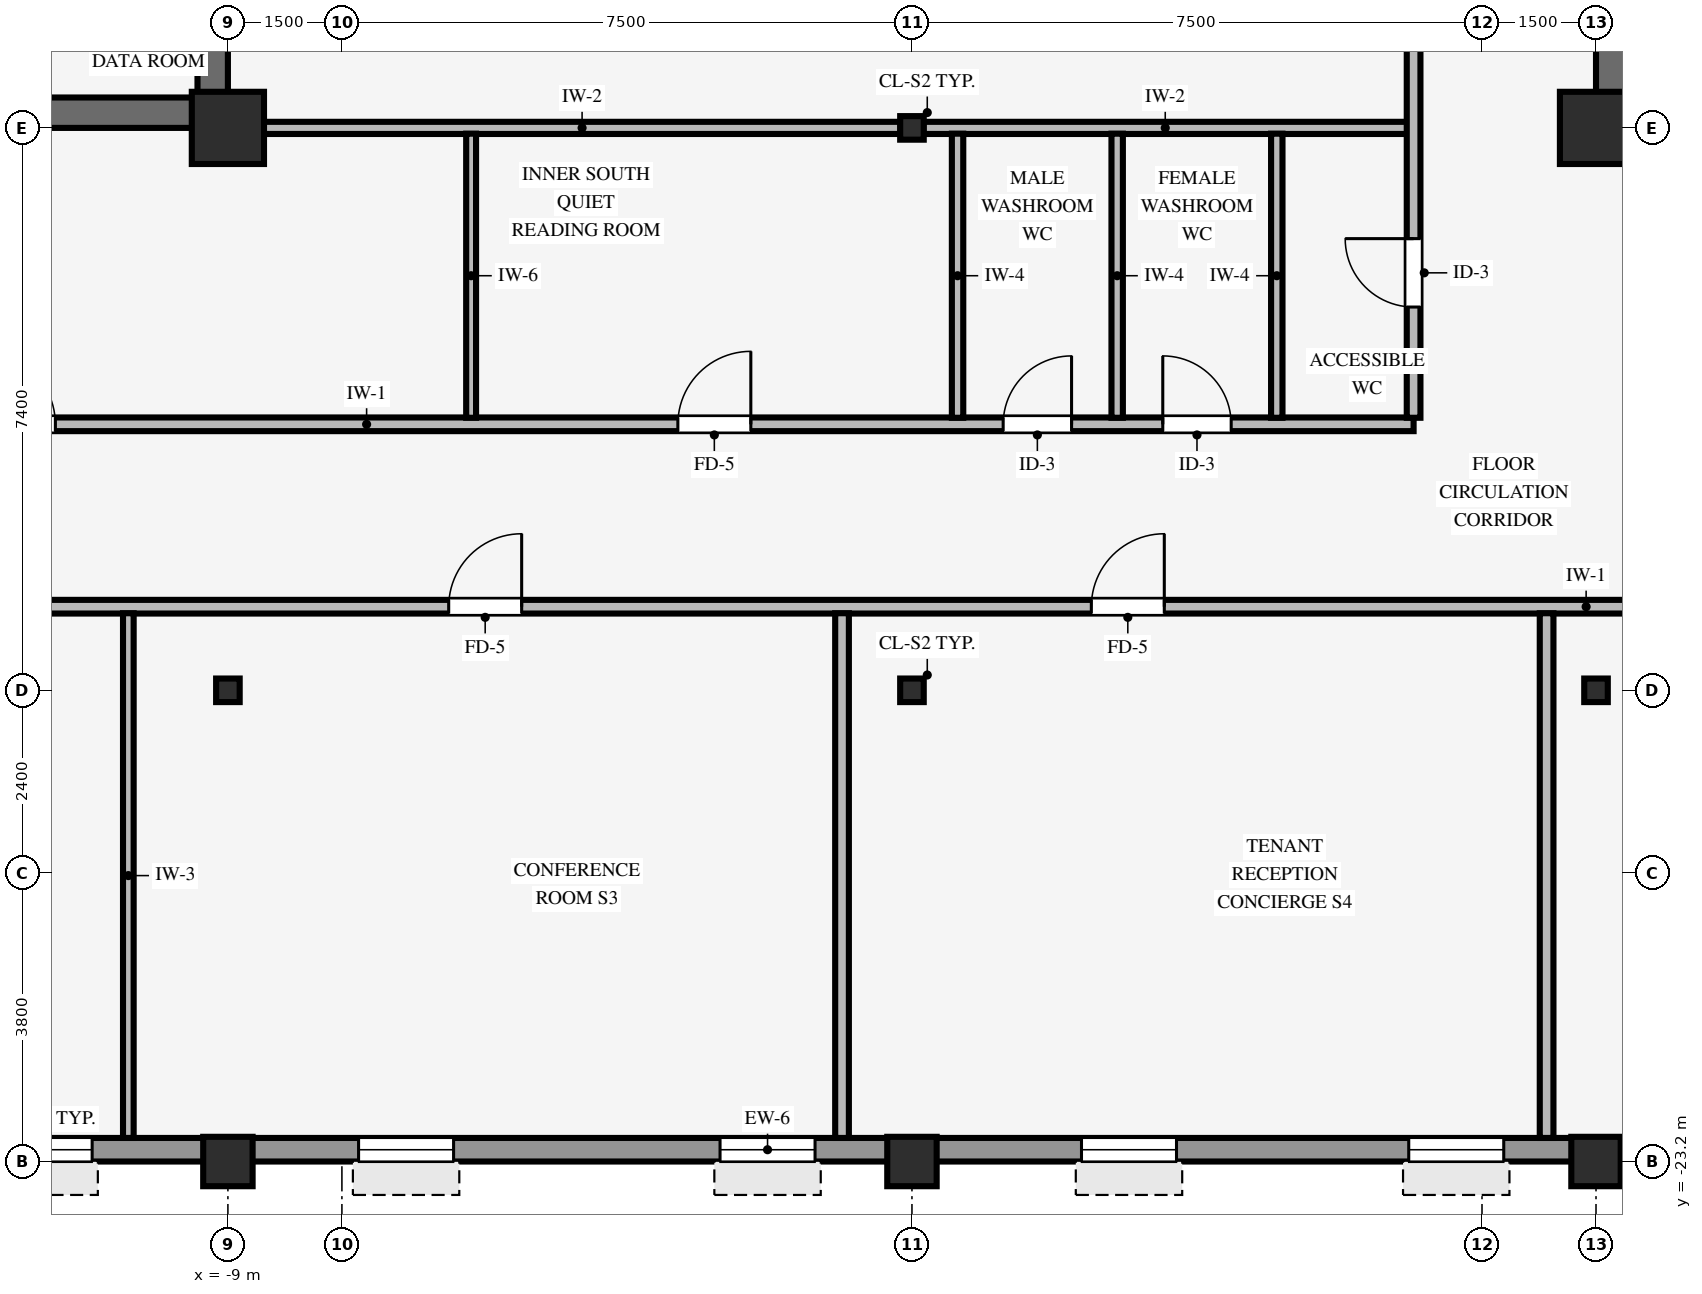
"""IFC4 building model, lengths in metres.
Left out: names, types, materials, properties, quantities, classifications, styles, units other than length and angle.
Written with IfcOpenShell. Run it as: python <this file> out.ifc"""

import sys

from ifc_helpers import new_model, si_unit, direction, frame, frame_2d, origin, origin_2d, place, context, subcontext, project, spatial, rectangle, hollow_rectangle, i_section, extrude, source, transform, mapped, element, fill, save


model = new_model("IFC4")
c1 = context("Model", 3, precision=1e-05, world=origin(), true_north=direction((0.0, 1.0)))
c2 = subcontext(c1, "Body", "Model", "MODEL_VIEW")
j1 = project(units=[si_unit("LENGTHUNIT", "METRE"), si_unit("PLANEANGLEUNIT", "RADIAN")], contexts=[c1])
p1 = place(None, origin())
s1 = spatial("IfcSite", under=j1, at=p1, CompositionType="ELEMENT")
p2 = place(p1, origin())
s2 = spatial("IfcBuilding", under=s1, at=p2, CompositionType="ELEMENT")
p3 = place(p2, frame((0.0, 0.0, 182.25)))
s3 = spatial("IfcBuildingStorey", under=s2, at=p3, CompositionType="ELEMENT", Elevation=182.25)
p4 = place(p3, frame((-17.5, -9.4, 0.0), z_axis=(0.0, 0.0, 1.0), x_axis=(1.0, 0.0, 0.0)))
e1 = element("IfcWall", 1, at=p4, inside=s3, PredefinedType="SHEAR", context=c2, shape_type="SweptSolid", body=[
    extrude(rectangle(XDim=8.5, YDim=0.4, at=frame_2d((4.25, 0.0))), origin(), (0.0, 0.0, 1.0), 3.25),
])
p5 = place(p3, frame((-9.2, -9.205, 0.0), z_axis=(0.0, 0.0, 1.0), x_axis=(0.0, 1.0, 0.0)))
e2 = element("IfcWall", 2, at=p5, inside=s3, PredefinedType="SHEAR", context=c2, shape_type="SweptSolid", body=[
    extrude(rectangle(XDim=18.41, YDim=0.4, at=frame_2d((9.205, 0.0))), origin(), (0.0, 0.0, 1.0), 3.25),
])
p6 = place(p5, frame((8.605, 0.0, 0.0)))
e3 = element("IfcOpeningElement", 3, at=p6, cuts=e2, PredefinedType="OPENING", context=c2, shape_type="SweptSolid", body=[
    extrude(rectangle(XDim=1.2, YDim=2.15, at=frame_2d((0.6, 1.075))), frame((0.0, 0.21, 0.0), z_axis=(0.0, -1.0, 0.0), x_axis=(1.0, 0.0, 0.0)), (0.0, 0.0, 1.0), 0.42),
])
p7 = place(p3, frame((9.0, -9.4, 0.0), z_axis=(0.0, 0.0, 1.0), x_axis=(1.0, 0.0, 0.0)))
e4 = element("IfcWall", 4, at=p7, inside=s3, PredefinedType="SHEAR", context=c2, shape_type="SweptSolid", body=[
    extrude(rectangle(XDim=8.5, YDim=0.4, at=frame_2d((4.25, 0.0))), origin(), (0.0, 0.0, 1.0), 3.25),
])
p8 = place(p3, frame((9.2, -9.205, 0.0), z_axis=(0.0, 0.0, 1.0), x_axis=(0.0, 1.0, 0.0)))
e5 = element("IfcWall", 5, at=p8, inside=s3, PredefinedType="SHEAR", context=c2, shape_type="SweptSolid", body=[
    extrude(rectangle(XDim=18.41, YDim=0.4, at=frame_2d((9.205, 0.0))), origin(), (0.0, 0.0, 1.0), 3.25),
])
p9 = place(p8, frame((8.605, 0.0, 0.0)))
e6 = element("IfcOpeningElement", 6, at=p9, cuts=e5, PredefinedType="OPENING", context=c2, shape_type="SweptSolid", body=[
    extrude(rectangle(XDim=1.2, YDim=2.15, at=frame_2d((0.6, 1.075))), frame((0.0, 0.21, 0.0), z_axis=(0.0, -1.0, 0.0), x_axis=(1.0, 0.0, 0.0)), (0.0, 0.0, 1.0), 0.42),
])
for number, where, z_axis, x_axis in (
    (7, (-9.0, -9.6, 0.0), (0.0, 0.0, 1.0), (1.0, 0.0, 0.0)),
    (8, (9.0, -9.6, 0.0), (0.0, 0.0, 1.0), (1.0, 0.0, 0.0)),
):
    element("IfcColumn", number, at=place(p3, frame(where, z_axis=z_axis, x_axis=x_axis)), inside=s3, PredefinedType="COLUMN", context=c2, shape_type="SweptSolid", body=[
        extrude(rectangle(XDim=0.95, YDim=0.95, at=origin_2d()), origin(), (0.0, 0.0, 1.0), 3.25),
    ])
for number, where, z_axis, x_axis in (
    (9, (-9.0, -23.2, 0.0), (0.0, 0.0, 1.0), (1.0, 0.0, 0.0)),
    (10, (0.0, -23.2, 0.0), (0.0, 0.0, 1.0), (1.0, 0.0, 0.0)),
    (11, (9.0, -23.2, 0.0), (0.0, 0.0, 1.0), (1.0, 0.0, 0.0)),
):
    element("IfcColumn", number, at=place(p3, frame(where, z_axis=z_axis, x_axis=x_axis)), inside=s3, PredefinedType="COLUMN", context=c2, shape_type="SweptSolid", body=[
        extrude(hollow_rectangle(XDim=0.65, YDim=0.65, WallThickness=0.04, InnerFilletRadius=0.04, OuterFilletRadius=0.08, at=origin_2d()), origin(), (0.0, 0.0, 1.0), 3.25),
    ])
for number, where, z_axis, x_axis in (
    (12, (0.0, -17.0, 0.0), (0.0, 0.0, 1.0), (1.0, 0.0, 0.0)),
    (13, (0.0, -9.6, 0.0), (0.0, 0.0, 1.0), (1.0, 0.0, 0.0)),
    (14, (-9.0, -17.0, 0.0), (0.0, 0.0, 1.0), (1.0, 0.0, 0.0)),
    (15, (9.0, -17.0, 0.0), (0.0, 0.0, 1.0), (1.0, 0.0, 0.0)),
):
    element("IfcColumn", number, at=place(p3, frame(where, z_axis=z_axis, x_axis=x_axis)), inside=s3, PredefinedType="COLUMN", context=c2, shape_type="SweptSolid", body=[
        extrude(i_section(OverallWidth=0.31, OverallDepth=0.31, WebThickness=0.015, FlangeThickness=0.015, FilletRadius=0.015, at=origin_2d()), origin(), (0.0, 0.0, 1.0), 3.25),
    ])
p10 = place(p3, frame((-24.3, -23.045, 0.0), z_axis=(0.0, 0.0, 1.0), x_axis=(1.0, 0.0, 0.0)))
e16 = element("IfcWall", 16, at=p10, inside=s3, PredefinedType="STANDARD", context=c2, shape_type="SweptSolid", body=[
    extrude(rectangle(XDim=44.8, YDim=0.31, at=frame_2d((22.4, 0.0))), origin(), (0.0, 0.0, 1.0), 2.585),
])
p11 = place(p10, frame((2.753, 0.0, 0.8)))
e17 = element("IfcOpeningElement", 17, at=p11, cuts=e16, PredefinedType="OPENING", context=c2, shape_type="SweptSolid", body=[
    extrude(rectangle(XDim=1.25, YDim=1.52, at=frame_2d((0.625, 0.76))), frame((0.0, 0.165, 0.0), z_axis=(0.0, -1.0, 0.0), x_axis=(1.0, 0.0, 0.0)), (0.0, 0.0, 1.0), 0.33),
])
p12 = place(p10, frame((7.508, 0.0, 0.8)))
e18 = element("IfcOpeningElement", 18, at=p12, cuts=e16, PredefinedType="OPENING", context=c2, shape_type="SweptSolid", body=[
    extrude(rectangle(XDim=1.25, YDim=1.52, at=frame_2d((0.625, 0.76))), frame((0.0, 0.165, 0.0), z_axis=(0.0, -1.0, 0.0), x_axis=(1.0, 0.0, 0.0)), (0.0, 0.0, 1.0), 0.33),
])
p13 = place(p10, frame((12.264, 0.0, 0.8)))
e19 = element("IfcOpeningElement", 19, at=p13, cuts=e16, PredefinedType="OPENING", context=c2, shape_type="SweptSolid", body=[
    extrude(rectangle(XDim=1.25, YDim=1.52, at=frame_2d((0.625, 0.76))), frame((0.0, 0.165, 0.0), z_axis=(0.0, -1.0, 0.0), x_axis=(1.0, 0.0, 0.0)), (0.0, 0.0, 1.0), 0.33),
])
p14 = place(p10, frame((17.019, 0.0, 0.8)))
e20 = element("IfcOpeningElement", 20, at=p14, cuts=e16, PredefinedType="OPENING", context=c2, shape_type="SweptSolid", body=[
    extrude(rectangle(XDim=1.25, YDim=1.52, at=frame_2d((0.625, 0.76))), frame((0.0, 0.165, 0.0), z_axis=(0.0, -1.0, 0.0), x_axis=(1.0, 0.0, 0.0)), (0.0, 0.0, 1.0), 0.33),
])
p15 = place(p10, frame((21.775, 0.0, 0.8)))
e21 = element("IfcOpeningElement", 21, at=p15, cuts=e16, PredefinedType="OPENING", context=c2, shape_type="SweptSolid", body=[
    extrude(rectangle(XDim=1.25, YDim=1.52, at=frame_2d((0.625, 0.76))), frame((0.0, 0.165, 0.0), z_axis=(0.0, -1.0, 0.0), x_axis=(1.0, 0.0, 0.0)), (0.0, 0.0, 1.0), 0.33),
])
p16 = place(p10, frame((26.531, 0.0, 0.8)))
e22 = element("IfcOpeningElement", 22, at=p16, cuts=e16, PredefinedType="OPENING", context=c2, shape_type="SweptSolid", body=[
    extrude(rectangle(XDim=1.25, YDim=1.52, at=frame_2d((0.625, 0.76))), frame((0.0, 0.165, 0.0), z_axis=(0.0, -1.0, 0.0), x_axis=(1.0, 0.0, 0.0)), (0.0, 0.0, 1.0), 0.33),
])
p17 = place(p10, frame((30.836, 0.0, 0.8)))
e23 = element("IfcOpeningElement", 23, at=p17, cuts=e16, PredefinedType="OPENING", context=c2, shape_type="SweptSolid", body=[
    extrude(rectangle(XDim=1.25, YDim=1.52, at=frame_2d((0.625, 0.76))), frame((0.0, 0.165, 0.0), z_axis=(0.0, -1.0, 0.0), x_axis=(1.0, 0.0, 0.0)), (0.0, 0.0, 1.0), 0.33),
])
p18 = place(p10, frame((36.042, 0.0, 0.8)))
e24 = element("IfcOpeningElement", 24, at=p18, cuts=e16, PredefinedType="OPENING", context=c2, shape_type="SweptSolid", body=[
    extrude(rectangle(XDim=1.25, YDim=1.52, at=frame_2d((0.625, 0.76))), frame((0.0, 0.165, 0.0), z_axis=(0.0, -1.0, 0.0), x_axis=(1.0, 0.0, 0.0)), (0.0, 0.0, 1.0), 0.33),
])
p19 = place(p10, frame((40.797, 0.0, 0.8)))
e25 = element("IfcOpeningElement", 25, at=p19, cuts=e16, PredefinedType="OPENING", context=c2, shape_type="SweptSolid", body=[
    extrude(rectangle(XDim=1.25, YDim=1.52, at=frame_2d((0.625, 0.76))), frame((0.0, 0.165, 0.0), z_axis=(0.0, -1.0, 0.0), x_axis=(1.0, 0.0, 0.0)), (0.0, 0.0, 1.0), 0.33),
])
p20 = place(p3, frame((-26.09, -15.9, 0.0), z_axis=(0.0, 0.0, 1.0), x_axis=(1.0, 0.0, 0.0)))
e26 = element("IfcWall", 26, at=p20, inside=s3, PredefinedType="PARTITIONING", context=c2, shape_type="SweptSolid", body=[
    extrude(rectangle(XDim=48.38, YDim=0.18, at=frame_2d((24.19, 0.0))), origin(), (0.0, 0.0, 1.0), 3.24),
])
p21 = place(p20, frame((40.51, 0.0, 0.0)))
e27 = element("IfcOpeningElement", 27, at=p21, cuts=e26, PredefinedType="OPENING", context=c2, shape_type="SweptSolid", body=[
    extrude(rectangle(XDim=0.96, YDim=2.1, at=frame_2d((0.48, 1.05))), frame((0.0, 0.1, 0.0), z_axis=(0.0, -1.0, 0.0), x_axis=(1.0, 0.0, 0.0)), (0.0, 0.0, 1.0), 0.2),
])
p22 = place(p20, frame((19.995, 0.0, 0.0)))
e28 = element("IfcOpeningElement", 28, at=p22, cuts=e26, PredefinedType="OPENING", context=c2, shape_type="SweptSolid", body=[
    extrude(rectangle(XDim=0.96, YDim=2.1, at=frame_2d((0.48, 1.05))), frame((0.0, 0.1, 0.0), z_axis=(0.0, -1.0, 0.0), x_axis=(1.0, 0.0, 0.0)), (0.0, 0.0, 1.0), 0.2),
])
p23 = place(p20, frame((28.45, 0.0, 0.0)))
e29 = element("IfcOpeningElement", 29, at=p23, cuts=e26, PredefinedType="OPENING", context=c2, shape_type="SweptSolid", body=[
    extrude(rectangle(XDim=0.96, YDim=2.1, at=frame_2d((0.48, 1.05))), frame((0.0, 0.1, 0.0), z_axis=(0.0, -1.0, 0.0), x_axis=(1.0, 0.0, 0.0)), (0.0, 0.0, 1.0), 0.2),
])
p24 = place(p20, frame((11.605, 0.0, 0.0)))
e30 = element("IfcOpeningElement", 30, at=p24, cuts=e26, PredefinedType="OPENING", context=c2, shape_type="SweptSolid", body=[
    extrude(rectangle(XDim=0.96, YDim=2.1, at=frame_2d((0.48, 1.05))), frame((0.0, 0.1, 0.0), z_axis=(0.0, -1.0, 0.0), x_axis=(1.0, 0.0, 0.0)), (0.0, 0.0, 1.0), 0.2),
])
p25 = place(p20, frame((2.465, 0.0, 0.0)))
e31 = element("IfcOpeningElement", 31, at=p25, cuts=e26, PredefinedType="OPENING", context=c2, shape_type="SweptSolid", body=[
    extrude(rectangle(XDim=0.96, YDim=2.1, at=frame_2d((0.48, 1.05))), frame((0.0, 0.1, 0.0), z_axis=(0.0, -1.0, 0.0), x_axis=(1.0, 0.0, 0.0)), (0.0, 0.0, 1.0), 0.2),
])
p26 = place(p3, frame((-17.7, -13.5, 0.0), z_axis=(0.0, 0.0, 1.0), x_axis=(1.0, 0.0, 0.0)))
e32 = element("IfcWall", 32, at=p26, inside=s3, PredefinedType="PARTITIONING", context=c2, shape_type="SweptSolid", body=[
    extrude(rectangle(XDim=24.3, YDim=0.18, at=frame_2d((12.15, 0.0))), origin(), (0.0, 0.0, 1.0), 2.888),
])
p27 = place(p26, frame((5.47, 0.0, 0.0)))
e33 = element("IfcOpeningElement", 33, at=p27, cuts=e32, PredefinedType="OPENING", context=c2, shape_type="SweptSolid", body=[
    extrude(rectangle(XDim=0.96, YDim=2.1, at=frame_2d((0.48, 1.05))), frame((0.0, 0.1, 0.0), z_axis=(0.0, -1.0, 0.0), x_axis=(1.0, 0.0, 0.0)), (0.0, 0.0, 1.0), 0.2),
])
p28 = place(p26, frame((14.62, 0.0, 0.0)))
e34 = element("IfcOpeningElement", 34, at=p28, cuts=e32, PredefinedType="OPENING", context=c2, shape_type="SweptSolid", body=[
    extrude(rectangle(XDim=0.96, YDim=2.1, at=frame_2d((0.48, 1.05))), frame((0.0, 0.1, 0.0), z_axis=(0.0, -1.0, 0.0), x_axis=(1.0, 0.0, 0.0)), (0.0, 0.0, 1.0), 0.2),
])
p29 = place(p26, frame((18.9, 0.0, 0.0)))
e35 = element("IfcOpeningElement", 35, at=p29, cuts=e32, PredefinedType="OPENING", context=c2, shape_type="SweptSolid", body=[
    extrude(rectangle(XDim=0.9, YDim=2.1, at=frame_2d((0.45, 1.05))), frame((0.0, 0.1, 0.0), z_axis=(0.0, -1.0, 0.0), x_axis=(1.0, 0.0, 0.0)), (0.0, 0.0, 1.0), 0.2),
])
p30 = place(p26, frame((21.0, 0.0, 0.0)))
e36 = element("IfcOpeningElement", 36, at=p30, cuts=e32, PredefinedType="OPENING", context=c2, shape_type="SweptSolid", body=[
    extrude(rectangle(XDim=0.9, YDim=2.1, at=frame_2d((0.45, 1.05))), frame((0.0, 0.1, 0.0), z_axis=(0.0, -1.0, 0.0), x_axis=(1.0, 0.0, 0.0)), (0.0, 0.0, 1.0), 0.2),
])
p31 = place(p3, frame((-8.529, -9.6, 0.0), z_axis=(0.0, 0.0, 1.0), x_axis=(1.0, 0.0, 0.0)))
e37 = element("IfcWall", 37, at=p31, inside=s3, PredefinedType="PARTITIONING", context=c2, shape_type="SweptSolid", body=[
    extrude(rectangle(XDim=8.378, YDim=0.16, at=frame_2d((4.189, 0.0))), origin(), (0.0, 0.0, 1.0), 2.285),
])
p32 = place(p3, frame((0.151, -9.6, 0.0), z_axis=(0.0, 0.0, 1.0), x_axis=(1.0, 0.0, 0.0)))
e38 = element("IfcWall", 38, at=p32, inside=s3, PredefinedType="PARTITIONING", context=c2, shape_type="SweptSolid", body=[
    extrude(rectangle(XDim=6.363, YDim=0.16, at=frame_2d((3.182, 0.0))), origin(), (0.0, 0.0, 1.0), 2.285),
])
p33 = place(p3, frame((-10.31, -22.89, 0.0), z_axis=(0.0, 0.0, 1.0), x_axis=(0.0, 1.0, 0.0)))
e39 = element("IfcWall", 39, at=p33, inside=s3, PredefinedType="PARTITIONING", context=c2, shape_type="SweptSolid", body=[
    extrude(rectangle(XDim=6.904, YDim=0.14, at=frame_2d((3.452, 0.0))), origin(), (0.0, 0.0, 1.0), 3.24),
])
p34 = place(p3, frame((-5.8, -13.414, 0.0), z_axis=(0.0, 0.0, 1.0), x_axis=(0.0, 1.0, 0.0)))
e40 = element("IfcWall", 40, at=p34, inside=s3, PredefinedType="PARTITIONING", context=c2, shape_type="SweptSolid", body=[
    extrude(rectangle(XDim=3.738, YDim=0.13, at=frame_2d((1.869, 0.0))), origin(), (0.0, 0.0, 1.0), 3.24),
])
p35 = place(p3, frame((-0.92, -22.89, 0.0), z_axis=(0.0, 0.0, 1.0), x_axis=(0.0, 1.0, 0.0)))
e41 = element("IfcWall", 41, at=p35, inside=s3, PredefinedType="PARTITIONING", context=c2, shape_type="SweptSolid", body=[
    extrude(rectangle(XDim=6.904, YDim=0.18, at=frame_2d((3.452, 0.0))), origin(), (0.0, 0.0, 1.0), 3.24),
])
for number, where, z_axis, x_axis in (
    (42, (0.6, -13.414, 0.0), (0.0, 0.0, 1.0), (0.0, 1.0, 0.0)),
    (43, (2.7, -13.414, 0.0), (0.0, 0.0, 1.0), (0.0, 1.0, 0.0)),
    (44, (4.8, -13.414, 0.0), (0.0, 0.0, 1.0), (0.0, 1.0, 0.0)),
):
    element("IfcWall", number, at=place(p3, frame(where, z_axis=z_axis, x_axis=x_axis)), inside=s3, PredefinedType="PARTITIONING", context=c2, shape_type="SweptSolid", body=[
        extrude(rectangle(XDim=3.738, YDim=0.15, at=frame_2d((1.869, 0.0))), origin(), (0.0, 0.0, 1.0), 3.24),
    ])
p36 = place(p3, frame((6.6, -13.414, 0.0), z_axis=(0.0, 0.0, 1.0), x_axis=(0.0, 1.0, 0.0)))
e45 = element("IfcWall", 45, at=p36, inside=s3, PredefinedType="PARTITIONING", context=c2, shape_type="SweptSolid", body=[
    extrude(rectangle(XDim=12.078, YDim=0.18, at=frame_2d((6.039, 0.0))), origin(), (0.0, 0.0, 1.0), 3.24),
])
p37 = place(p36, frame((1.457, 0.0, 0.0)))
e46 = element("IfcOpeningElement", 46, at=p37, cuts=e45, PredefinedType="OPENING", context=c2, shape_type="SweptSolid", body=[
    extrude(rectangle(XDim=0.9, YDim=2.1, at=frame_2d((0.45, 1.05))), frame((0.0, 0.1, 0.0), z_axis=(0.0, -1.0, 0.0), x_axis=(1.0, 0.0, 0.0)), (0.0, 0.0, 1.0), 0.2),
])
p38 = place(p3, frame((8.35, -22.89, 0.0), z_axis=(0.0, 0.0, 1.0), x_axis=(0.0, 1.0, 0.0)))
e47 = element("IfcWall", 47, at=p38, inside=s3, PredefinedType="PARTITIONING", context=c2, shape_type="SweptSolid", body=[
    extrude(rectangle(XDim=6.904, YDim=0.18, at=frame_2d((3.452, 0.0))), origin(), (0.0, 0.0, 1.0), 3.24),
])
m1 = source(origin(), c2, "Body", "SweptSolid", [
    extrude(rectangle(XDim=1.25, YDim=1.52, at=frame_2d((0.625, 0.76))), frame((0.0, 0.03, 0.0), z_axis=(0.0, -1.0, 0.0), x_axis=(1.0, 0.0, 0.0)), (0.0, 0.0, 1.0), 0.06),
])
p39 = place(p13, origin())
e48 = element("IfcWindow", 48, at=p39, inside=s3, PartitioningType="SINGLE_PANEL", PredefinedType="WINDOW", context=c2, shape_type="MappedRepresentation", body=[
    mapped(m1, transform((0.0, 0.0, 0.0), scale=1.0)),
])
fill(e19, e48)
p40 = place(p14, origin())
e49 = element("IfcWindow", 49, at=p40, inside=s3, PartitioningType="SINGLE_PANEL", PredefinedType="WINDOW", context=c2, shape_type="MappedRepresentation", body=[
    mapped(m1, transform((0.0, 0.0, 0.0), scale=1.0)),
])
fill(e20, e49)
p41 = place(p15, origin())
e50 = element("IfcWindow", 50, at=p41, inside=s3, PartitioningType="SINGLE_PANEL", PredefinedType="WINDOW", context=c2, shape_type="MappedRepresentation", body=[
    mapped(m1, transform((0.0, 0.0, 0.0), scale=1.0)),
])
fill(e21, e50)
p42 = place(p16, origin())
e51 = element("IfcWindow", 51, at=p42, inside=s3, PartitioningType="SINGLE_PANEL", PredefinedType="WINDOW", context=c2, shape_type="MappedRepresentation", body=[
    mapped(m1, transform((0.0, 0.0, 0.0), scale=1.0)),
])
fill(e22, e51)
p43 = place(p17, origin())
e52 = element("IfcWindow", 52, at=p43, inside=s3, PartitioningType="SINGLE_PANEL", PredefinedType="WINDOW", context=c2, shape_type="MappedRepresentation", body=[
    mapped(m1, transform((0.0, 0.0, 0.0), scale=1.0)),
])
fill(e23, e52)
m2 = source(origin(), c2, "Body", "SweptSolid", [
    extrude(rectangle(XDim=0.96, YDim=2.1, at=frame_2d((0.48, 1.05))), frame((0.0, 0.025, 0.0), z_axis=(0.0, -1.0, 0.0), x_axis=(1.0, 0.0, 0.0)), (0.0, 0.0, 1.0), 0.05),
])
p44 = place(p27, origin())
e53 = element("IfcDoor", 53, at=p44, inside=s3, OperationType="SINGLE_SWING_LEFT", PredefinedType="DOOR", context=c2, shape_type="MappedRepresentation", body=[
    mapped(m2, transform((0.0, 0.0, 0.0), scale=1.0)),
])
fill(e33, e53)
p45 = place(p22, origin())
e54 = element("IfcDoor", 54, at=p45, inside=s3, OperationType="SINGLE_SWING_RIGHT", PredefinedType="DOOR", context=c2, shape_type="MappedRepresentation", body=[
    mapped(m2, transform((0.0, 0.0, 0.0), scale=1.0)),
])
fill(e28, e54)
p46 = place(p23, origin())
e55 = element("IfcDoor", 55, at=p46, inside=s3, OperationType="SINGLE_SWING_RIGHT", PredefinedType="DOOR", context=c2, shape_type="MappedRepresentation", body=[
    mapped(m2, transform((0.0, 0.0, 0.0), scale=1.0)),
])
fill(e29, e55)
p47 = place(p28, origin())
e56 = element("IfcDoor", 56, at=p47, inside=s3, OperationType="SINGLE_SWING_RIGHT", PredefinedType="DOOR", context=c2, shape_type="MappedRepresentation", body=[
    mapped(m2, transform((0.0, 0.0, 0.0), scale=1.0)),
])
fill(e34, e56)
m3 = source(origin(), c2, "Body", "SweptSolid", [
    extrude(rectangle(XDim=0.9, YDim=2.1, at=frame_2d((0.45, 1.05))), frame((0.0, 0.025, 0.0), z_axis=(0.0, -1.0, 0.0), x_axis=(1.0, 0.0, 0.0)), (0.0, 0.0, 1.0), 0.05),
])
p48 = place(p37, origin())
e57 = element("IfcDoor", 57, at=p48, inside=s3, OperationType="SINGLE_SWING_RIGHT", PredefinedType="DOOR", context=c2, shape_type="MappedRepresentation", body=[
    mapped(m3, transform((0.0, 0.0, 0.0), scale=1.0)),
])
fill(e46, e57)
p49 = place(p29, origin())
e58 = element("IfcDoor", 58, at=p49, inside=s3, OperationType="SINGLE_SWING_RIGHT", PredefinedType="DOOR", context=c2, shape_type="MappedRepresentation", body=[
    mapped(m3, transform((0.0, 0.0, 0.0), scale=1.0)),
])
fill(e35, e58)
p50 = place(p30, origin())
e59 = element("IfcDoor", 59, at=p50, inside=s3, OperationType="SINGLE_SWING_LEFT", PredefinedType="DOOR", context=c2, shape_type="MappedRepresentation", body=[
    mapped(m3, transform((0.0, 0.0, 0.0), scale=1.0)),
])
fill(e36, e59)
save(model, sys.argv[1])
